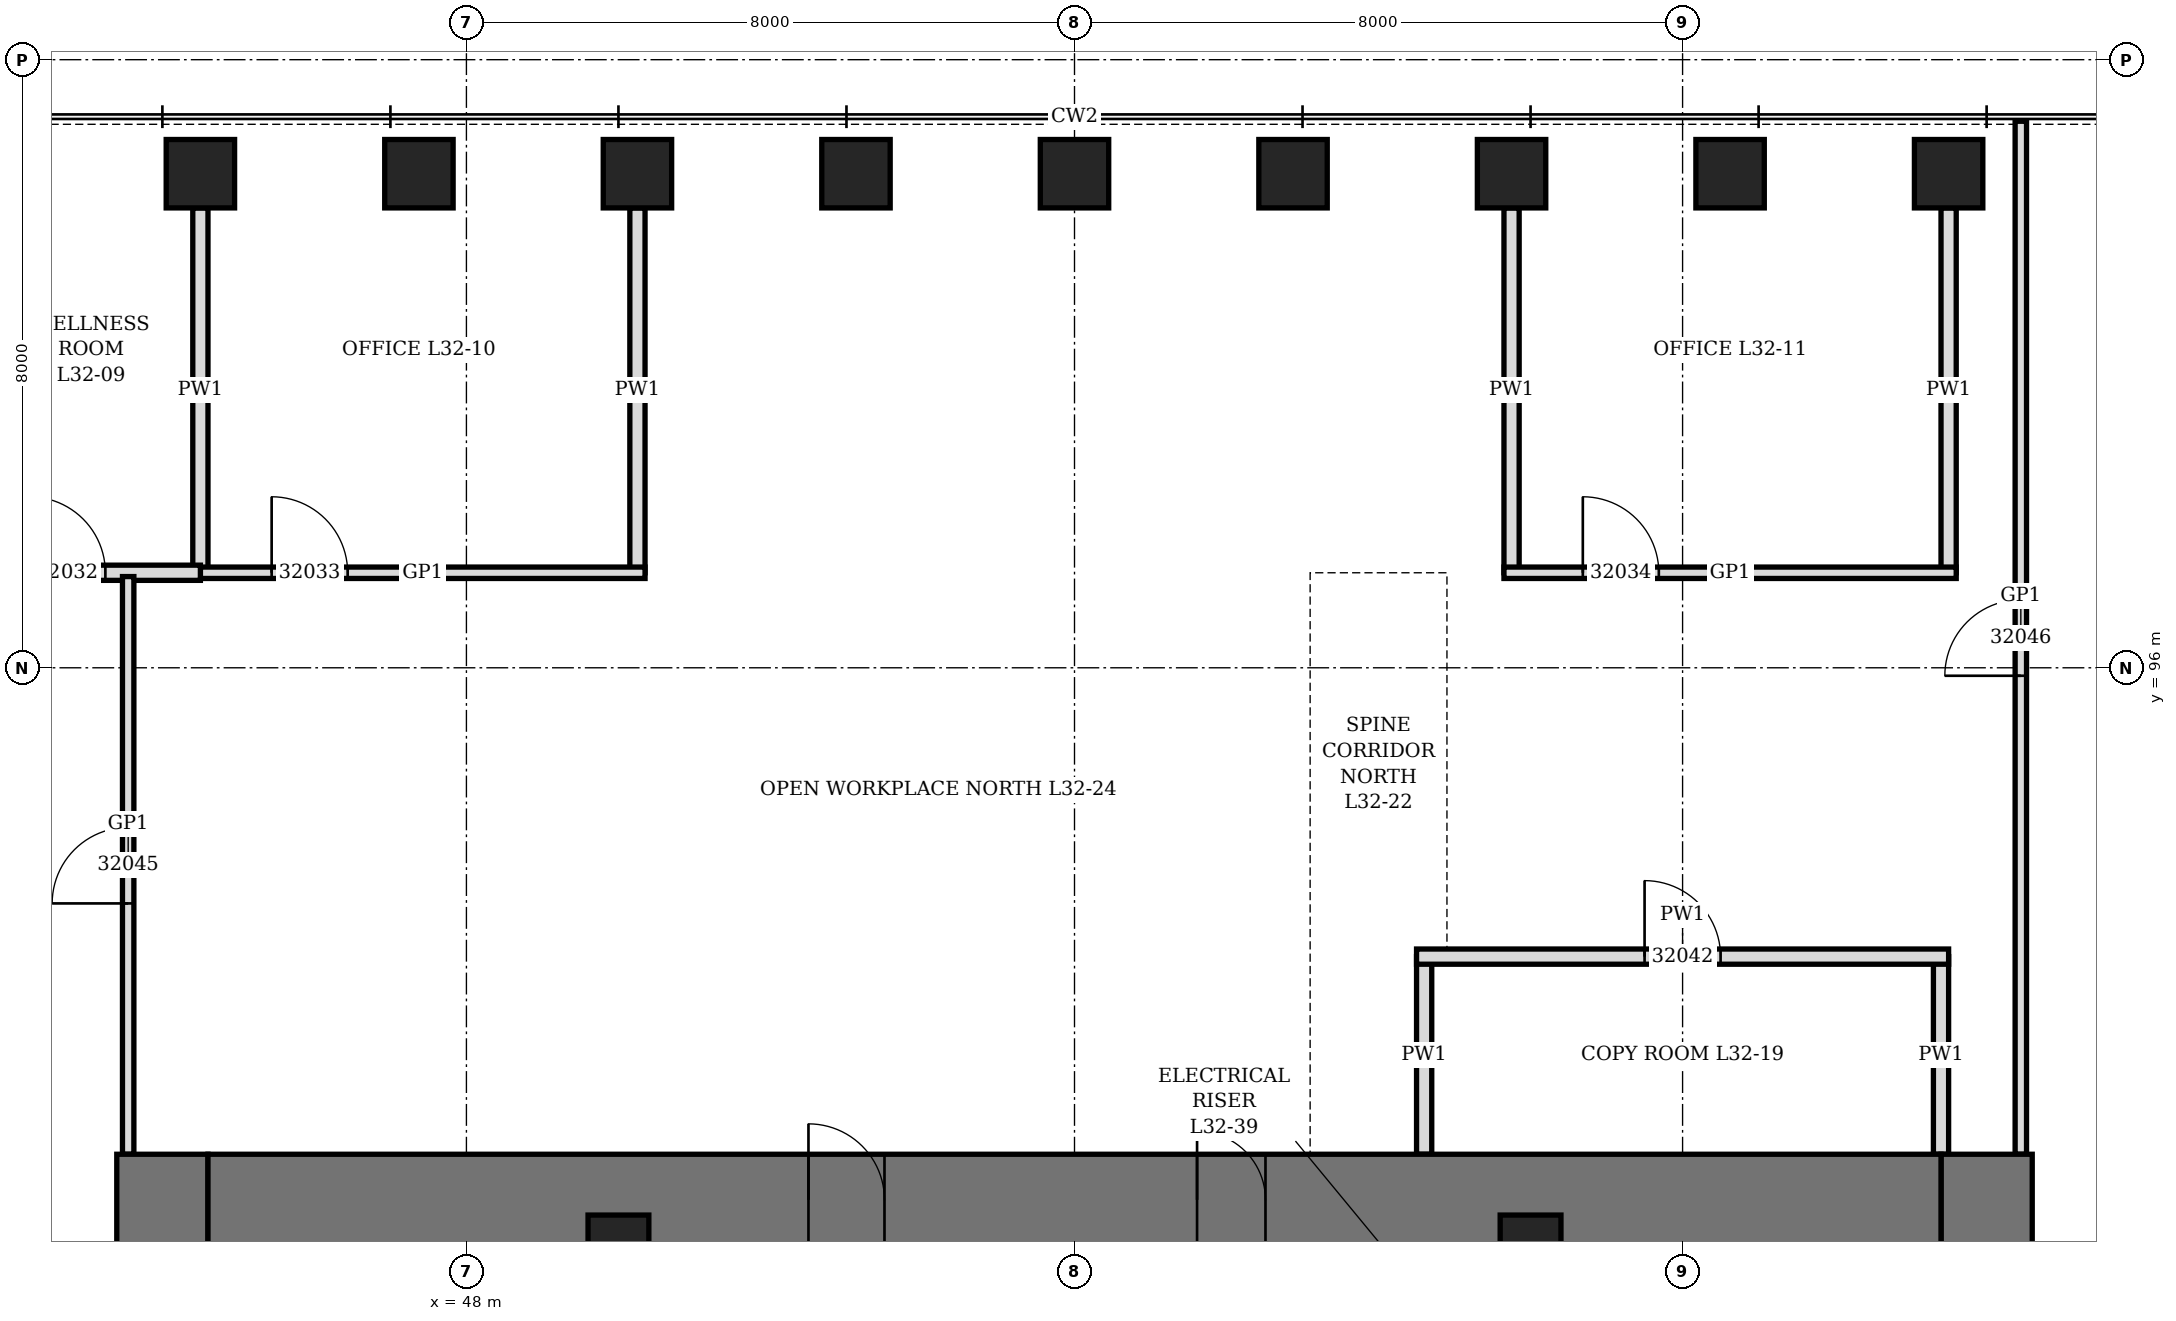
"""IFC4 building model, lengths in metres.
Left out: names, types, materials, properties, quantities, classifications, styles, units other than length and angle.
Written with IfcOpenShell. Run it as: python <this file> out.ifc"""

import sys

from ifc_helpers import new_model, si_unit, direction, frame, frame_2d, origin, origin_2d, place, context, subcontext, project, spatial, rectangle, hollow_rectangle, extrude, element, fill, save


model = new_model("IFC4")
c1 = context("Model", 3, precision=1e-05, world=origin(), true_north=direction((0.0, 1.0)))
c2 = subcontext(c1, "Body", "Model", "MODEL_VIEW")
j1 = project(units=[si_unit("LENGTHUNIT", "METRE"), si_unit("PLANEANGLEUNIT", "RADIAN")], contexts=[c1])
p1 = place(None, origin())
s1 = spatial("IfcSite", under=j1, at=p1, CompositionType="ELEMENT")
p2 = place(p1, origin())
s2 = spatial("IfcBuilding", under=s1, at=p2, CompositionType="ELEMENT")
p3 = place(p2, frame((0.0, 0.0, 145.9)))
s3 = spatial("IfcBuildingStorey", under=s2, at=p3, CompositionType="ELEMENT", Elevation=145.9)
for number, where, z_axis, x_axis in (
    (1, (67.5, 102.5, 0.0), (0.0, 0.0, 1.0), (1.0, 0.0, 0.0)),
    (2, (64.625, 102.5, 0.0), (0.0, 0.0, 1.0), (1.0, 0.0, 0.0)),
    (3, (61.75, 102.5, 0.0), (0.0, 0.0, 1.0), (1.0, 0.0, 0.0)),
    (4, (58.875, 102.5, 0.0), (0.0, 0.0, 1.0), (1.0, 0.0, 0.0)),
    (5, (56.0, 102.5, 0.0), (0.0, 0.0, 1.0), (1.0, 0.0, 0.0)),
    (6, (53.125, 102.5, 0.0), (0.0, 0.0, 1.0), (1.0, 0.0, 0.0)),
    (7, (50.25, 102.5, 0.0), (0.0, 0.0, 1.0), (1.0, 0.0, 0.0)),
    (8, (47.375, 102.5, 0.0), (0.0, 0.0, 1.0), (1.0, 0.0, 0.0)),
    (9, (44.5, 102.5, 0.0), (0.0, 0.0, 1.0), (1.0, 0.0, 0.0)),
):
    element("IfcColumn", number, at=place(p3, frame(where, z_axis=z_axis, x_axis=x_axis)), inside=s3, PredefinedType="COLUMN", context=c2, shape_type="SweptSolid", body=[
        extrude(hollow_rectangle(XDim=0.9, YDim=0.9, WallThickness=0.12, at=origin_2d()), origin(), (0.0, 0.0, 1.0), 4.2),
    ])
p4 = place(p3, frame((44.0, 70.4, 0.0), z_axis=(0.0, 0.0, 1.0), x_axis=(0.0, 1.0, 0.0)))
e10 = element("IfcWall", 10, at=p4, inside=s3, PredefinedType="SHEAR", context=c2, shape_type="SweptSolid", body=[
    extrude(rectangle(XDim=19.2, YDim=1.2, at=frame_2d((9.6, 0.0))), origin(), (0.0, 0.0, 1.0), 4.2),
])
p5 = place(p4, frame((8.6, 0.0, 0.0)))
e11 = element("IfcOpeningElement", 11, at=p5, cuts=e10, PredefinedType="OPENING", context=c2, shape_type="SweptSolid", body=[
    extrude(rectangle(XDim=2.0, YDim=2.4, at=frame_2d((1.0, 1.2))), frame((0.0, 0.61, 0.0), z_axis=(0.0, -1.0, 0.0), x_axis=(1.0, 0.0, 0.0)), (0.0, 0.0, 1.0), 1.22),
])
p6 = place(p3, frame((68.0, 70.4, 0.0), z_axis=(0.0, 0.0, 1.0), x_axis=(0.0, 1.0, 0.0)))
e12 = element("IfcWall", 12, at=p6, inside=s3, PredefinedType="SHEAR", context=c2, shape_type="SweptSolid", body=[
    extrude(rectangle(XDim=19.2, YDim=1.2, at=frame_2d((9.6, 0.0))), origin(), (0.0, 0.0, 1.0), 4.2),
])
p7 = place(p6, frame((8.6, 0.0, 0.0)))
e13 = element("IfcOpeningElement", 13, at=p7, cuts=e12, PredefinedType="OPENING", context=c2, shape_type="SweptSolid", body=[
    extrude(rectangle(XDim=2.0, YDim=2.4, at=frame_2d((1.0, 1.2))), frame((0.0, 0.61, 0.0), z_axis=(0.0, -1.0, 0.0), x_axis=(1.0, 0.0, 0.0)), (0.0, 0.0, 1.0), 1.22),
])
p8 = place(p3, frame((44.6, 89.0, 0.0), z_axis=(0.0, 0.0, 1.0), x_axis=(1.0, 0.0, 0.0)))
e14 = element("IfcWall", 14, at=p8, inside=s3, PredefinedType="SHEAR", context=c2, shape_type="SweptSolid", body=[
    extrude(rectangle(XDim=22.8, YDim=1.2, at=frame_2d((11.4, 0.0))), origin(), (0.0, 0.0, 1.0), 4.2),
])
p9 = place(p8, frame((7.9, 0.0, 0.0)))
e15 = element("IfcOpeningElement", 15, at=p9, cuts=e14, PredefinedType="OPENING", context=c2, shape_type="SweptSolid", body=[
    extrude(rectangle(XDim=1.0, YDim=2.1, at=frame_2d((0.5, 1.05))), frame((0.0, 0.61, 0.0), z_axis=(0.0, -1.0, 0.0), x_axis=(1.0, 0.0, 0.0)), (0.0, 0.0, 1.0), 1.22),
])
p10 = place(p8, frame((13.012, 0.0, 0.0)))
e16 = element("IfcOpeningElement", 16, at=p10, cuts=e14, PredefinedType="OPENING", context=c2, shape_type="SweptSolid", body=[
    extrude(rectangle(XDim=0.9, YDim=2.1, at=frame_2d((0.45, 1.05))), frame((0.0, 0.61, 0.0), z_axis=(0.0, -1.0, 0.0), x_axis=(1.0, 0.0, 0.0)), (0.0, 0.0, 1.0), 1.22),
])
for number, where, z_axis, x_axis in (
    (17, (50.0, 88.4, 0.0), (0.0, 0.0, 1.0), (1.0, 0.0, 0.0)),
    (18, (62.0, 88.4, 0.0), (0.0, 0.0, 1.0), (1.0, 0.0, 0.0)),
):
    element("IfcColumn", number, at=place(p3, frame(where, z_axis=z_axis, x_axis=x_axis)), inside=s3, PredefinedType="COLUMN", context=c2, shape_type="SweptSolid", body=[
        extrude(hollow_rectangle(XDim=0.8, YDim=0.8, WallThickness=0.1, at=origin_2d()), origin(), (0.0, 0.0, 1.0), 4.2),
    ])
p11 = place(p3, frame((44.5, 97.25, 0.0), z_axis=(0.0, 0.0, 1.0), x_axis=(0.0, 1.0, 0.0)))
e19 = element("IfcWall", 19, at=p11, inside=s3, PredefinedType="PARTITIONING", context=c2, shape_type="SweptSolid", body=[
    extrude(rectangle(XDim=4.8, YDim=0.2, at=frame_2d((2.4, 0.0))), origin(), (0.0, 0.0, 1.0), 2.74),
])
for number, where, z_axis, x_axis in (
    (20, (50.25, 97.25, 0.0), (0.0, 0.0, 1.0), (0.0, 1.0, 0.0)),
    (21, (61.75, 97.25, 0.0), (0.0, 0.0, 1.0), (0.0, 1.0, 0.0)),
):
    element("IfcWall", number, at=place(p3, frame(where, z_axis=z_axis, x_axis=x_axis)), inside=s3, PredefinedType="PARTITIONING", context=c2, shape_type="SweptSolid", body=[
        extrude(rectangle(XDim=4.8, YDim=0.2, at=frame_2d((2.4, 0.0))), origin(), (0.0, 0.0, 1.0), 3.278),
    ])
p12 = place(p3, frame((67.5, 97.25, 0.0), z_axis=(0.0, 0.0, 1.0), x_axis=(0.0, 1.0, 0.0)))
e22 = element("IfcWall", 22, at=p12, inside=s3, PredefinedType="PARTITIONING", context=c2, shape_type="SweptSolid", body=[
    extrude(rectangle(XDim=4.8, YDim=0.2, at=frame_2d((2.4, 0.0))), origin(), (0.0, 0.0, 1.0), 2.74),
])
p13 = place(p3, frame((60.6, 89.6, 0.0), z_axis=(0.0, 0.0, 1.0), x_axis=(0.0, 1.0, 0.0)))
e23 = element("IfcWall", 23, at=p13, inside=s3, PredefinedType="PARTITIONING", context=c2, shape_type="SweptSolid", body=[
    extrude(rectangle(XDim=2.6, YDim=0.2, at=frame_2d((1.3, 0.0))), origin(), (0.0, 0.0, 1.0), 4.04),
])
p14 = place(p3, frame((67.4, 89.6, 0.0), z_axis=(0.0, 0.0, 1.0), x_axis=(0.0, 1.0, 0.0)))
e24 = element("IfcWall", 24, at=p14, inside=s3, PredefinedType="PARTITIONING", context=c2, shape_type="SweptSolid", body=[
    extrude(rectangle(XDim=2.6, YDim=0.2, at=frame_2d((1.3, 0.0))), origin(), (0.0, 0.0, 1.0), 2.74),
])
p15 = place(p3, frame((60.5, 92.2, 0.0), z_axis=(0.0, 0.0, 1.0), x_axis=(1.0, 0.0, 0.0)))
e25 = element("IfcWall", 25, at=p15, inside=s3, PredefinedType="PARTITIONING", context=c2, shape_type="SweptSolid", body=[
    extrude(rectangle(XDim=7.0, YDim=0.2, at=frame_2d((3.5, 0.0))), origin(), (0.0, 0.0, 1.0), 4.04),
])
p16 = place(p15, frame((3.0, 0.0, 0.0)))
e26 = element("IfcOpeningElement", 26, at=p16, cuts=e25, PredefinedType="OPENING", context=c2, shape_type="SweptSolid", body=[
    extrude(rectangle(XDim=1.0, YDim=2.1, at=frame_2d((0.5, 1.05))), frame((0.0, 0.11, 0.0), z_axis=(0.0, -1.0, 0.0), x_axis=(1.0, 0.0, 0.0)), (0.0, 0.0, 1.0), 0.22),
])
p17 = place(p3, frame((44.5, 97.25, 0.0), z_axis=(0.0, 0.0, 1.0), x_axis=(1.0, 0.0, 0.0)))
e27 = element("IfcWall", 27, at=p17, inside=s3, PredefinedType="PARTITIONING", context=c2, shape_type="SweptSolid", body=[
    extrude(rectangle(XDim=5.85, YDim=0.15, at=frame_2d((2.925, 0.0))), origin(), (0.0, 0.0, 1.0), 4.04),
])
p18 = place(p17, frame((0.938, 0.0, 0.0)))
e28 = element("IfcOpeningElement", 28, at=p18, cuts=e27, PredefinedType="OPENING", context=c2, shape_type="SweptSolid", body=[
    extrude(rectangle(XDim=1.0, YDim=2.1, at=frame_2d((0.5, 1.05))), frame((0.0, 0.085, 0.0), z_axis=(0.0, -1.0, 0.0), x_axis=(1.0, 0.0, 0.0)), (0.0, 0.0, 1.0), 0.17),
])
p19 = place(p3, frame((61.65, 97.25, 0.0), z_axis=(0.0, 0.0, 1.0), x_axis=(1.0, 0.0, 0.0)))
e29 = element("IfcWall", 29, at=p19, inside=s3, PredefinedType="PARTITIONING", context=c2, shape_type="SweptSolid", body=[
    extrude(rectangle(XDim=5.95, YDim=0.15, at=frame_2d((2.975, 0.0))), origin(), (0.0, 0.0, 1.0), 4.04),
])
p20 = place(p19, frame((1.038, 0.0, 0.0)))
e30 = element("IfcOpeningElement", 30, at=p20, cuts=e29, PredefinedType="OPENING", context=c2, shape_type="SweptSolid", body=[
    extrude(rectangle(XDim=1.0, YDim=2.1, at=frame_2d((0.5, 1.05))), frame((0.0, 0.085, 0.0), z_axis=(0.0, -1.0, 0.0), x_axis=(1.0, 0.0, 0.0)), (0.0, 0.0, 1.0), 0.17),
])
p21 = place(p3, frame((39.2, 97.25, 0.0), z_axis=(0.0, 0.0, 1.0), x_axis=(1.0, 0.0, 0.0)))
e31 = element("IfcWall", 31, at=p21, inside=s3, PredefinedType="PARTITIONING", context=c2, shape_type="SweptSolid", body=[
    extrude(rectangle(XDim=5.3, YDim=0.2, at=frame_2d((2.65, 0.0))), origin(), (0.0, 0.0, 1.0), 4.04),
])
p22 = place(p21, frame((0.488, 0.0, 0.0)))
e32 = element("IfcOpeningElement", 32, at=p22, cuts=e31, PredefinedType="OPENING", context=c2, shape_type="SweptSolid", body=[
    extrude(rectangle(XDim=1.0, YDim=2.1, at=frame_2d((0.5, 1.05))), frame((0.0, 0.11, 0.0), z_axis=(0.0, -1.0, 0.0), x_axis=(1.0, 0.0, 0.0)), (0.0, 0.0, 1.0), 0.22),
])
p23 = place(p21, frame((3.05, 0.0, 0.0)))
e33 = element("IfcOpeningElement", 33, at=p23, cuts=e31, PredefinedType="OPENING", context=c2, shape_type="SweptSolid", body=[
    extrude(rectangle(XDim=1.0, YDim=2.1, at=frame_2d((0.5, 1.05))), frame((0.0, 0.11, 0.0), z_axis=(0.0, -1.0, 0.0), x_axis=(1.0, 0.0, 0.0)), (0.0, 0.0, 1.0), 0.22),
])
p24 = place(p3, frame((43.55, 89.6, 0.0), z_axis=(0.0, 0.0, 1.0), x_axis=(0.0, 1.0, 0.0)))
e34 = element("IfcWall", 34, at=p24, inside=s3, PredefinedType="PARTITIONING", context=c2, shape_type="SweptSolid", body=[
    extrude(rectangle(XDim=7.6, YDim=0.15, at=frame_2d((3.8, 0.0))), origin(), (0.0, 0.0, 1.0), 4.04),
])
p25 = place(p24, frame((3.3, 0.0, 0.0)))
e35 = element("IfcOpeningElement", 35, at=p25, cuts=e34, PredefinedType="OPENING", context=c2, shape_type="SweptSolid", body=[
    extrude(rectangle(XDim=1.0, YDim=2.4, at=frame_2d((0.5, 1.2))), frame((0.0, 0.085, 0.0), z_axis=(0.0, -1.0, 0.0), x_axis=(1.0, 0.0, 0.0)), (0.0, 0.0, 1.0), 0.17),
])
p26 = place(p3, frame((68.45, 89.6, 0.0), z_axis=(0.0, 0.0, 1.0), x_axis=(0.0, 1.0, 0.0)))
e36 = element("IfcWall", 36, at=p26, inside=s3, PredefinedType="PARTITIONING", context=c2, shape_type="SweptSolid", body=[
    extrude(rectangle(XDim=13.59, YDim=0.15, at=frame_2d((6.795, 0.0))), origin(), (0.0, 0.0, 1.0), 4.04),
])
p27 = place(p26, frame((6.295, 0.0, 0.0)))
e37 = element("IfcOpeningElement", 37, at=p27, cuts=e36, PredefinedType="OPENING", context=c2, shape_type="SweptSolid", body=[
    extrude(rectangle(XDim=1.0, YDim=2.4, at=frame_2d((0.5, 1.2))), frame((0.0, 0.085, 0.0), z_axis=(0.0, -1.0, 0.0), x_axis=(1.0, 0.0, 0.0)), (0.0, 0.0, 1.0), 0.17),
])
p28 = place(p9, origin())
e38 = element("IfcDoor", 38, at=p28, inside=s3, OperationType="SINGLE_SWING_LEFT", PredefinedType="DOOR", context=c2, shape_type="SweptSolid", body=[
    extrude(rectangle(XDim=1.0, YDim=2.1, at=frame_2d((0.5, 1.05))), frame((0.0, 0.35, 0.0), z_axis=(0.0, -1.0, 0.0), x_axis=(1.0, 0.0, 0.0)), (0.0, 0.0, 1.0), 0.7),
])
fill(e15, e38)
p29 = place(p10, origin())
e39 = element("IfcDoor", 39, at=p29, inside=s3, OperationType="SINGLE_SWING_LEFT", PredefinedType="DOOR", context=c2, shape_type="SweptSolid", body=[
    extrude(rectangle(XDim=0.9, YDim=2.1, at=frame_2d((0.45, 1.05))), frame((0.0, 0.35, 0.0), z_axis=(0.0, -1.0, 0.0), x_axis=(1.0, 0.0, 0.0)), (0.0, 0.0, 1.0), 0.7),
])
fill(e16, e39)
p30 = place(p23, origin())
e40 = element("IfcDoor", 40, at=p30, inside=s3, OperationType="SINGLE_SWING_LEFT", PredefinedType="DOOR", context=c2, shape_type="SweptSolid", body=[
    extrude(rectangle(XDim=1.0, YDim=2.1, at=frame_2d((0.5, 1.05))), frame((0.0, 0.1, 0.0), z_axis=(0.0, -1.0, 0.0), x_axis=(1.0, 0.0, 0.0)), (0.0, 0.0, 1.0), 0.199),
])
fill(e33, e40)
p31 = place(p18, origin())
e41 = element("IfcDoor", 41, at=p31, inside=s3, OperationType="SINGLE_SWING_LEFT", PredefinedType="DOOR", context=c2, shape_type="SweptSolid", body=[
    extrude(rectangle(XDim=1.0, YDim=2.1, at=frame_2d((0.5, 1.05))), frame((0.0, 0.075, 0.0), z_axis=(0.0, -1.0, 0.0), x_axis=(1.0, 0.0, 0.0)), (0.0, 0.0, 1.0), 0.149),
])
fill(e28, e41)
p32 = place(p20, origin())
e42 = element("IfcDoor", 42, at=p32, inside=s3, OperationType="SINGLE_SWING_LEFT", PredefinedType="DOOR", context=c2, shape_type="SweptSolid", body=[
    extrude(rectangle(XDim=1.0, YDim=2.1, at=frame_2d((0.5, 1.05))), frame((0.0, 0.075, 0.0), z_axis=(0.0, -1.0, 0.0), x_axis=(1.0, 0.0, 0.0)), (0.0, 0.0, 1.0), 0.149),
])
fill(e30, e42)
p33 = place(p16, origin())
e43 = element("IfcDoor", 43, at=p33, inside=s3, OperationType="SINGLE_SWING_LEFT", PredefinedType="DOOR", context=c2, shape_type="SweptSolid", body=[
    extrude(rectangle(XDim=1.0, YDim=2.1, at=frame_2d((0.5, 1.05))), frame((0.0, 0.1, 0.0), z_axis=(0.0, -1.0, 0.0), x_axis=(1.0, 0.0, 0.0)), (0.0, 0.0, 1.0), 0.199),
])
fill(e26, e43)
p34 = place(p25, origin())
e44 = element("IfcDoor", 44, at=p34, inside=s3, OperationType="SINGLE_SWING_RIGHT", PredefinedType="DOOR", context=c2, shape_type="SweptSolid", body=[
    extrude(rectangle(XDim=1.0, YDim=2.4, at=frame_2d((0.5, 1.2))), frame((0.0, 0.075, 0.0), z_axis=(0.0, -1.0, 0.0), x_axis=(1.0, 0.0, 0.0)), (0.0, 0.0, 1.0), 0.149),
])
fill(e35, e44)
p35 = place(p27, origin())
e45 = element("IfcDoor", 45, at=p35, inside=s3, OperationType="SINGLE_SWING_RIGHT", PredefinedType="DOOR", context=c2, shape_type="SweptSolid", body=[
    extrude(rectangle(XDim=1.0, YDim=2.4, at=frame_2d((0.5, 1.2))), frame((0.0, 0.075, 0.0), z_axis=(0.0, -1.0, 0.0), x_axis=(1.0, 0.0, 0.0)), (0.0, 0.0, 1.0), 0.149),
])
fill(e37, e45)
save(model, sys.argv[1])
